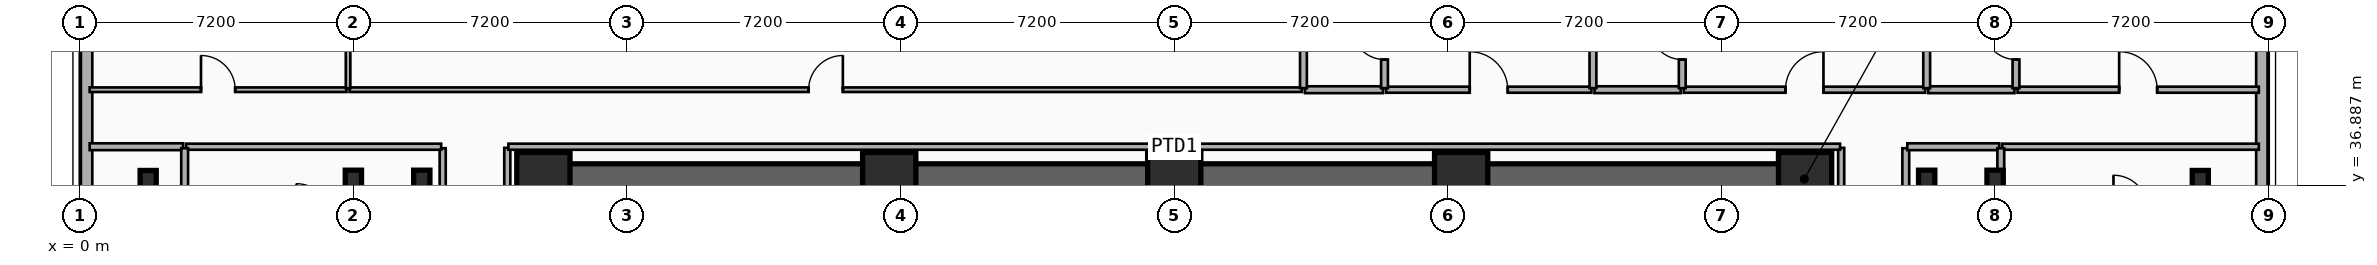
"""IFC4 building model, lengths in metres.
Left out: names, types, materials, properties, quantities, classifications, styles, units other than length and angle.
Written with IfcOpenShell. Run it as: python <this file> out.ifc"""

import sys

from ifc_helpers import new_model, si_unit, direction, frame, frame_2d, origin, origin_2d, place, context, subcontext, project, spatial, rectangle, i_section, extrude, element, fill, save


model = new_model("IFC4")
c1 = context("Model", 3, precision=1e-05, world=origin(), true_north=direction((0.0, 1.0)))
c2 = subcontext(c1, "Body", "Model", "MODEL_VIEW")
j1 = project(units=[si_unit("LENGTHUNIT", "METRE"), si_unit("PLANEANGLEUNIT", "RADIAN")], contexts=[c1])
p1 = place(None, origin())
s1 = spatial("IfcSite", under=j1, at=p1, CompositionType="ELEMENT")
p2 = place(p1, origin())
s2 = spatial("IfcBuilding", under=s1, at=p2, CompositionType="ELEMENT")
p3 = place(p2, frame((0.0, 0.0, 29.0)))
s3 = spatial("IfcBuildingStorey", under=s2, at=p3, CompositionType="ELEMENT", Elevation=29.0)
p4 = place(p3, frame((12.15, 37.05, 0.0), z_axis=(0.0, 0.0, 1.0), x_axis=(1.0, 0.0, 0.0)))
e1 = element("IfcWall", 1, at=p4, inside=s3, PredefinedType="SHEAR", context=c2, shape_type="SweptSolid", body=[
    extrude(rectangle(XDim=33.23, YDim=0.8, at=frame_2d((16.615, 0.0))), origin(), (0.0, 0.0, 1.0), 3.5),
])
for number, where, z_axis, x_axis in (
    (2, (12.2, 37.05, 0.0), (0.0, 0.0, 1.0), (1.0, 0.0, 0.0)),
    (3, (21.3, 37.05, 0.0), (0.0, 0.0, 1.0), (1.0, 0.0, 0.0)),
    (4, (28.8, 37.05, 0.0), (0.0, 0.0, 1.0), (1.0, 0.0, 0.0)),
    (5, (36.35, 37.05, 0.0), (0.0, 0.0, 1.0), (1.0, 0.0, 0.0)),
    (6, (45.4, 37.05, 0.0), (0.0, 0.0, 1.0), (1.0, 0.0, 0.0)),
):
    element("IfcColumn", number, at=place(p3, frame(where, z_axis=z_axis, x_axis=x_axis)), inside=s3, PredefinedType="COLUMN", context=c2, shape_type="SweptSolid", body=[
        extrude(rectangle(XDim=1.4, YDim=1.4, at=origin_2d()), origin(), (0.0, 0.0, 1.0), 3.5),
    ])
for number, where, z_axis, x_axis in (
    (7, (9.0, 37.05, 0.0), (0.0, 0.0, 1.0), (1.0, 0.0, 0.0)),
    (8, (48.6, 37.05, 0.0), (0.0, 0.0, 1.0), (1.0, 0.0, 0.0)),
):
    element("IfcColumn", number, at=place(p3, frame(where, z_axis=z_axis, x_axis=x_axis)), inside=s3, PredefinedType="COLUMN", context=c2, shape_type="SweptSolid", body=[
        extrude(i_section(OverallWidth=0.428, OverallDepth=0.465, WebThickness=0.045, FlangeThickness=0.073, FilletRadius=0.015, at=origin_2d()), origin(), (0.0, 0.0, 1.0), 3.5),
    ])
p5 = place(p3, frame((1.8, 37.05, 0.0), z_axis=(0.0, 0.0, 1.0), x_axis=(1.0, 0.0, 0.0)))
e9 = element("IfcColumn", 9, at=p5, inside=s3, PredefinedType="COLUMN", context=c2, shape_type="SweptSolid", body=[
    extrude(i_section(OverallWidth=0.424, OverallDepth=0.45, WebThickness=0.041, FlangeThickness=0.065, FilletRadius=0.015, at=origin_2d()), origin(), (0.0, 0.0, 1.0), 3.5),
])
for number, where, z_axis, x_axis in (
    (10, (7.2, 37.05, 0.0), (0.0, 0.0, 1.0), (1.0, 0.0, 0.0)),
    (11, (50.4, 37.05, 0.0), (0.0, 0.0, 1.0), (1.0, 0.0, 0.0)),
):
    element("IfcColumn", number, at=place(p3, frame(where, z_axis=z_axis, x_axis=x_axis)), inside=s3, PredefinedType="COLUMN", context=c2, shape_type="SweptSolid", body=[
        extrude(i_section(OverallWidth=0.428, OverallDepth=0.465, WebThickness=0.045, FlangeThickness=0.073, FilletRadius=0.015, at=origin_2d()), origin(), (0.0, 0.0, 1.0), 3.5),
    ])
p6 = place(p3, frame((55.8, 37.05, 0.0), z_axis=(0.0, 0.0, 1.0), x_axis=(1.0, 0.0, 0.0)))
e12 = element("IfcColumn", 12, at=p6, inside=s3, PredefinedType="COLUMN", context=c2, shape_type="SweptSolid", body=[
    extrude(i_section(OverallWidth=0.424, OverallDepth=0.45, WebThickness=0.041, FlangeThickness=0.065, FilletRadius=0.015, at=origin_2d()), origin(), (0.0, 0.0, 1.0), 3.5),
])
p7 = place(p3, frame((57.42, 41.0, 0.0), z_axis=(0.0, 0.0, 1.0), x_axis=(0.0, -1.0, 0.0)))
e13 = element("IfcWall", 13, at=p7, inside=s3, PredefinedType="SOLIDWALL", context=c2, shape_type="SweptSolid", body=[
    extrude(rectangle(XDim=15.2, YDim=0.3, at=frame_2d((7.6, 0.0))), origin(), (0.0, 0.0, 1.0), 3.24),
])
p8 = place(p7, frame((10.882, 0.0, 0.48)))
e14 = element("IfcOpeningElement", 14, at=p8, cuts=e13, PredefinedType="OPENING", context=c2, shape_type="SweptSolid", body=[
    extrude(rectangle(XDim=1.4, YDim=1.8, at=frame_2d((0.7, 0.9))), frame((0.0, 0.16, 0.0), z_axis=(0.0, -1.0, 0.0), x_axis=(1.0, 0.0, 0.0)), (0.0, 0.0, 1.0), 0.32),
])
p9 = place(p7, frame((5.621, 0.0, 0.48)))
e15 = element("IfcOpeningElement", 15, at=p9, cuts=e13, PredefinedType="OPENING", context=c2, shape_type="SweptSolid", body=[
    extrude(rectangle(XDim=1.4, YDim=1.8, at=frame_2d((0.7, 0.9))), frame((0.0, 0.16, 0.0), z_axis=(0.0, -1.0, 0.0), x_axis=(1.0, 0.0, 0.0)), (0.0, 0.0, 1.0), 0.32),
])
p10 = place(p3, frame((0.18, 25.8, 0.0), z_axis=(0.0, 0.0, 1.0), x_axis=(0.0, 1.0, 0.0)))
e16 = element("IfcWall", 16, at=p10, inside=s3, PredefinedType="SOLIDWALL", context=c2, shape_type="SweptSolid", body=[
    extrude(rectangle(XDim=15.2, YDim=0.3, at=frame_2d((7.6, 0.0))), origin(), (0.0, 0.0, 1.0), 3.24),
])
p11 = place(p10, frame((2.67, 0.0, 0.48)))
e17 = element("IfcOpeningElement", 17, at=p11, cuts=e16, PredefinedType="OPENING", context=c2, shape_type="SweptSolid", body=[
    extrude(rectangle(XDim=1.4, YDim=1.8, at=frame_2d((0.7, 0.9))), frame((0.0, 0.16, 0.0), z_axis=(0.0, -1.0, 0.0), x_axis=(1.0, 0.0, 0.0)), (0.0, 0.0, 1.0), 0.32),
])
p12 = place(p10, frame((7.709, 0.0, 0.48)))
e18 = element("IfcOpeningElement", 18, at=p12, cuts=e16, PredefinedType="OPENING", context=c2, shape_type="SweptSolid", body=[
    extrude(rectangle(XDim=1.4, YDim=1.8, at=frame_2d((0.7, 0.9))), frame((0.0, 0.16, 0.0), z_axis=(0.0, -1.0, 0.0), x_axis=(1.0, 0.0, 0.0)), (0.0, 0.0, 1.0), 0.32),
])
p13 = place(p3, frame((9.55, 36.067, 0.0), z_axis=(0.0, 0.0, 1.0), x_axis=(0.0, 1.0, 0.0)))
e19 = element("IfcWall", 19, at=p13, inside=s3, PredefinedType="PARTITIONING", context=c2, shape_type="SweptSolid", body=[
    extrude(rectangle(XDim=1.793, YDim=0.16, at=frame_2d((0.896, 0.0))), origin(), (0.0, 0.0, 1.0), 2.72),
])
p14 = place(p3, frame((48.05, 36.29, 0.0), z_axis=(0.0, 0.0, 1.0), x_axis=(0.0, 1.0, 0.0)))
e20 = element("IfcWall", 20, at=p14, inside=s3, PredefinedType="PLUMBINGWALL", context=c2, shape_type="SweptSolid", body=[
    extrude(rectangle(XDim=1.57, YDim=0.18, at=frame_2d((0.785, 0.0))), origin(), (0.0, 0.0, 1.0), 2.72),
])
p15 = place(p3, frame((0.26, 37.9, 0.0), z_axis=(0.0, 0.0, 1.0), x_axis=(1.0, 0.0, 0.0)))
e21 = element("IfcWall", 21, at=p15, inside=s3, PredefinedType="PLUMBINGWALL", context=c2, shape_type="SweptSolid", body=[
    extrude(rectangle(XDim=2.46, YDim=0.18, at=frame_2d((1.23, 0.0))), origin(), (0.0, 0.0, 1.0), 3.24),
])
p16 = place(p3, frame((2.8, 37.9, 0.0), z_axis=(0.0, 0.0, 1.0), x_axis=(1.0, 0.0, 0.0)))
e22 = element("IfcWall", 22, at=p16, inside=s3, PredefinedType="PARTITIONING", context=c2, shape_type="SweptSolid", body=[
    extrude(rectangle(XDim=6.71, YDim=0.16, at=frame_2d((3.355, 0.0))), origin(), (0.0, 0.0, 1.0), 3.24),
])
p17 = place(p3, frame((48.09, 37.9, 0.0), z_axis=(0.0, 0.0, 1.0), x_axis=(1.0, 0.0, 0.0)))
e23 = element("IfcWall", 23, at=p17, inside=s3, PredefinedType="PLUMBINGWALL", context=c2, shape_type="SweptSolid", body=[
    extrude(rectangle(XDim=2.42, YDim=0.18, at=frame_2d((1.21, 0.0))), origin(), (0.0, 0.0, 1.0), 3.24),
])
p18 = place(p3, frame((50.59, 37.9, 0.0), z_axis=(0.0, 0.0, 1.0), x_axis=(1.0, 0.0, 0.0)))
e24 = element("IfcWall", 24, at=p18, inside=s3, PredefinedType="PARTITIONING", context=c2, shape_type="SweptSolid", body=[
    extrude(rectangle(XDim=6.75, YDim=0.16, at=frame_2d((3.375, 0.0))), origin(), (0.0, 0.0, 1.0), 3.24),
])
p19 = place(p3, frame((0.26, 39.4, 0.0), z_axis=(0.0, 0.0, 1.0), x_axis=(1.0, 0.0, 0.0)))
e25 = element("IfcWall", 25, at=p19, inside=s3, PredefinedType="PARTITIONING", context=c2, shape_type="SweptSolid", body=[
    extrude(rectangle(XDim=6.76, YDim=0.12, at=frame_2d((3.38, 0.0))), origin(), (0.0, 0.0, 1.0), 3.24),
])
p20 = place(p19, frame((2.93, 0.0, 0.0)))
e26 = element("IfcOpeningElement", 26, at=p20, cuts=e25, PredefinedType="OPENING", context=c2, shape_type="SweptSolid", body=[
    extrude(rectangle(XDim=0.9, YDim=2.1, at=frame_2d((0.45, 1.05))), frame((0.0, 0.07, 0.0), z_axis=(0.0, -1.0, 0.0), x_axis=(1.0, 0.0, 0.0)), (0.0, 0.0, 1.0), 0.14),
])
p21 = place(p3, frame((7.1, 39.4, 0.0), z_axis=(0.0, 0.0, 1.0), x_axis=(1.0, 0.0, 0.0)))
e27 = element("IfcWall", 27, at=p21, inside=s3, PredefinedType="PARTITIONING", context=c2, shape_type="SweptSolid", body=[
    extrude(rectangle(XDim=25.06, YDim=0.12, at=frame_2d((12.53, 0.0))), origin(), (0.0, 0.0, 1.0), 3.24),
])
p22 = place(p21, frame((12.08, 0.0, 0.0)))
e28 = element("IfcOpeningElement", 28, at=p22, cuts=e27, PredefinedType="OPENING", context=c2, shape_type="SweptSolid", body=[
    extrude(rectangle(XDim=0.9, YDim=2.1, at=frame_2d((0.45, 1.05))), frame((0.0, 0.07, 0.0), z_axis=(0.0, -1.0, 0.0), x_axis=(1.0, 0.0, 0.0)), (0.0, 0.0, 1.0), 0.14),
])
p23 = place(p3, frame((34.373, 39.4, 0.0), z_axis=(0.0, 0.0, 1.0), x_axis=(1.0, 0.0, 0.0)))
e29 = element("IfcWall", 29, at=p23, inside=s3, PredefinedType="PARTITIONING", context=c2, shape_type="SweptSolid", body=[
    extrude(rectangle(XDim=5.405, YDim=0.16, at=frame_2d((2.703, 0.0))), origin(), (0.0, 0.0, 1.0), 3.24),
])
p24 = place(p23, frame((2.202, 0.0, 0.0)))
e30 = element("IfcOpeningElement", 30, at=p24, cuts=e29, PredefinedType="OPENING", context=c2, shape_type="SweptSolid", body=[
    extrude(rectangle(XDim=1.0, YDim=2.15, at=frame_2d((0.5, 1.075))), frame((0.0, 0.09, 0.0), z_axis=(0.0, -1.0, 0.0), x_axis=(1.0, 0.0, 0.0)), (0.0, 0.0, 1.0), 0.18),
])
p25 = place(p3, frame((32.24, 39.4, 0.0), z_axis=(0.0, 0.0, 1.0), x_axis=(1.0, 0.0, 0.0)))
e31 = element("IfcWall", 31, at=p25, inside=s3, PredefinedType="PLUMBINGWALL", context=c2, shape_type="SweptSolid", body=[
    extrude(rectangle(XDim=2.053, YDim=0.18, at=frame_2d((1.026, 0.0))), origin(), (0.0, 0.0, 1.0), 3.24),
])
p26 = place(p3, frame((42.208, 39.4, 0.0), z_axis=(0.0, 0.0, 1.0), x_axis=(1.0, 0.0, 0.0)))
e32 = element("IfcWall", 32, at=p26, inside=s3, PredefinedType="PARTITIONING", context=c2, shape_type="SweptSolid", body=[
    extrude(rectangle(XDim=6.352, YDim=0.16, at=frame_2d((3.176, 0.0))), origin(), (0.0, 0.0, 1.0), 3.24),
])
p27 = place(p26, frame((2.676, 0.0, 0.0)))
e33 = element("IfcOpeningElement", 33, at=p27, cuts=e32, PredefinedType="OPENING", context=c2, shape_type="SweptSolid", body=[
    extrude(rectangle(XDim=1.0, YDim=2.15, at=frame_2d((0.5, 1.075))), frame((0.0, 0.09, 0.0), z_axis=(0.0, -1.0, 0.0), x_axis=(1.0, 0.0, 0.0)), (0.0, 0.0, 1.0), 0.18),
])
p28 = place(p3, frame((39.858, 39.4, 0.0), z_axis=(0.0, 0.0, 1.0), x_axis=(1.0, 0.0, 0.0)))
e34 = element("IfcWall", 34, at=p28, inside=s3, PredefinedType="PLUMBINGWALL", context=c2, shape_type="SweptSolid", body=[
    extrude(rectangle(XDim=2.27, YDim=0.18, at=frame_2d((1.135, 0.0))), origin(), (0.0, 0.0, 1.0), 3.24),
])
p29 = place(p3, frame((50.99, 39.4, 0.0), z_axis=(0.0, 0.0, 1.0), x_axis=(1.0, 0.0, 0.0)))
e35 = element("IfcWall", 35, at=p29, inside=s3, PredefinedType="PARTITIONING", context=c2, shape_type="SweptSolid", body=[
    extrude(rectangle(XDim=6.35, YDim=0.16, at=frame_2d((3.175, 0.0))), origin(), (0.0, 0.0, 1.0), 3.24),
])
p30 = place(p29, frame((2.675, 0.0, 0.0)))
e36 = element("IfcOpeningElement", 36, at=p30, cuts=e35, PredefinedType="OPENING", context=c2, shape_type="SweptSolid", body=[
    extrude(rectangle(XDim=1.0, YDim=2.15, at=frame_2d((0.5, 1.075))), frame((0.0, 0.09, 0.0), z_axis=(0.0, -1.0, 0.0), x_axis=(1.0, 0.0, 0.0)), (0.0, 0.0, 1.0), 0.18),
])
p31 = place(p3, frame((48.64, 39.4, 0.0), z_axis=(0.0, 0.0, 1.0), x_axis=(1.0, 0.0, 0.0)))
e37 = element("IfcWall", 37, at=p31, inside=s3, PredefinedType="PLUMBINGWALL", context=c2, shape_type="SweptSolid", body=[
    extrude(rectangle(XDim=2.27, YDim=0.18, at=frame_2d((1.135, 0.0))), origin(), (0.0, 0.0, 1.0), 3.24),
])
p32 = place(p3, frame((2.76, 36.067, 0.0), z_axis=(0.0, 0.0, 1.0), x_axis=(0.0, 1.0, 0.0)))
e38 = element("IfcWall", 38, at=p32, inside=s3, PredefinedType="PLUMBINGWALL", context=c2, shape_type="SweptSolid", body=[
    extrude(rectangle(XDim=1.793, YDim=0.18, at=frame_2d((0.896, 0.0))), origin(), (0.0, 0.0, 1.0), 2.72),
])
p33 = place(p3, frame((50.55, 36.29, 0.0), z_axis=(0.0, 0.0, 1.0), x_axis=(0.0, 1.0, 0.0)))
e39 = element("IfcWall", 39, at=p33, inside=s3, PredefinedType="PLUMBINGWALL", context=c2, shape_type="SweptSolid", body=[
    extrude(rectangle(XDim=1.57, YDim=0.18, at=frame_2d((0.785, 0.0))), origin(), (0.0, 0.0, 1.0), 2.57),
])
p34 = place(p3, frame((7.06, 39.44, 0.0), z_axis=(0.0, 0.0, 1.0), x_axis=(0.0, 1.0, 0.0)))
e40 = element("IfcWall", 40, at=p34, inside=s3, PredefinedType="PARTITIONING", context=c2, shape_type="SweptSolid", body=[
    extrude(rectangle(XDim=5.5, YDim=0.12, at=frame_2d((2.75, 0.0))), origin(), (0.0, 0.0, 1.0), 3.24),
])
p35 = place(p3, frame((32.2, 39.44, 0.0), z_axis=(0.0, 0.0, 1.0), x_axis=(0.0, 1.0, 0.0)))
e41 = element("IfcWall", 41, at=p35, inside=s3, PredefinedType="PLUMBINGWALL", context=c2, shape_type="SweptSolid", body=[
    extrude(rectangle(XDim=2.358, YDim=0.18, at=frame_2d((1.179, 0.0))), origin(), (0.0, 0.0, 1.0), 3.24),
])
p36 = place(p3, frame((34.333, 39.44, 0.0), z_axis=(0.0, 0.0, 1.0), x_axis=(0.0, 1.0, 0.0)))
e42 = element("IfcWall", 42, at=p36, inside=s3, PredefinedType="PLUMBINGWALL", context=c2, shape_type="SweptSolid", body=[
    extrude(rectangle(XDim=2.358, YDim=0.18, at=frame_2d((1.179, 0.0))), origin(), (0.0, 0.0, 1.0), 3.24),
])
p37 = place(p36, frame((0.754, 0.0, 0.0)))
e43 = element("IfcOpeningElement", 43, at=p37, cuts=e42, PredefinedType="OPENING", context=c2, shape_type="SweptSolid", body=[
    extrude(rectangle(XDim=0.85, YDim=2.1, at=frame_2d((0.425, 1.05))), frame((0.0, 0.1, 0.0), z_axis=(0.0, -1.0, 0.0), x_axis=(1.0, 0.0, 0.0)), (0.0, 0.0, 1.0), 0.2),
])
p38 = place(p3, frame((39.818, 39.44, 0.0), z_axis=(0.0, 0.0, 1.0), x_axis=(0.0, 1.0, 0.0)))
e44 = element("IfcWall", 44, at=p38, inside=s3, PredefinedType="PLUMBINGWALL", context=c2, shape_type="SweptSolid", body=[
    extrude(rectangle(XDim=2.358, YDim=0.18, at=frame_2d((1.179, 0.0))), origin(), (0.0, 0.0, 1.0), 3.24),
])
p39 = place(p3, frame((42.168, 39.44, 0.0), z_axis=(0.0, 0.0, 1.0), x_axis=(0.0, 1.0, 0.0)))
e45 = element("IfcWall", 45, at=p39, inside=s3, PredefinedType="PLUMBINGWALL", context=c2, shape_type="SweptSolid", body=[
    extrude(rectangle(XDim=2.358, YDim=0.18, at=frame_2d((1.179, 0.0))), origin(), (0.0, 0.0, 1.0), 3.24),
])
p40 = place(p39, frame((0.754, 0.0, 0.0)))
e46 = element("IfcOpeningElement", 46, at=p40, cuts=e45, PredefinedType="OPENING", context=c2, shape_type="SweptSolid", body=[
    extrude(rectangle(XDim=0.85, YDim=2.1, at=frame_2d((0.425, 1.05))), frame((0.0, 0.1, 0.0), z_axis=(0.0, -1.0, 0.0), x_axis=(1.0, 0.0, 0.0)), (0.0, 0.0, 1.0), 0.2),
])
p41 = place(p3, frame((48.6, 39.44, 0.0), z_axis=(0.0, 0.0, 1.0), x_axis=(0.0, 1.0, 0.0)))
e47 = element("IfcWall", 47, at=p41, inside=s3, PredefinedType="PLUMBINGWALL", context=c2, shape_type="SweptSolid", body=[
    extrude(rectangle(XDim=2.358, YDim=0.18, at=frame_2d((1.179, 0.0))), origin(), (0.0, 0.0, 1.0), 3.24),
])
p42 = place(p3, frame((50.95, 39.44, 0.0), z_axis=(0.0, 0.0, 1.0), x_axis=(0.0, 1.0, 0.0)))
e48 = element("IfcWall", 48, at=p42, inside=s3, PredefinedType="PLUMBINGWALL", context=c2, shape_type="SweptSolid", body=[
    extrude(rectangle(XDim=2.358, YDim=0.18, at=frame_2d((1.179, 0.0))), origin(), (0.0, 0.0, 1.0), 3.24),
])
p43 = place(p42, frame((0.754, 0.0, 0.0)))
e49 = element("IfcOpeningElement", 49, at=p43, cuts=e48, PredefinedType="OPENING", context=c2, shape_type="SweptSolid", body=[
    extrude(rectangle(XDim=0.85, YDim=2.1, at=frame_2d((0.425, 1.05))), frame((0.0, 0.1, 0.0), z_axis=(0.0, -1.0, 0.0), x_axis=(1.0, 0.0, 0.0)), (0.0, 0.0, 1.0), 0.2),
])
for number, where, z_axis, x_axis in (
    (50, (11.25, 27.63, 0.0), (0.0, 0.0, 1.0), (0.0, 1.0, 0.0)),
    (51, (46.35, 27.63, 0.0), (0.0, 0.0, 1.0), (0.0, 1.0, 0.0)),
):
    element("IfcWall", number, at=place(p3, frame(where, z_axis=z_axis, x_axis=x_axis)), inside=s3, PredefinedType="PARTITIONING", context=c2, shape_type="SweptSolid", body=[
        extrude(rectangle(XDim=10.24, YDim=0.16, at=frame_2d((5.12, 0.0))), origin(), (0.0, 0.0, 1.0), 2.72),
    ])
p44 = place(p3, frame((11.28, 37.9, 0.0), z_axis=(0.0, 0.0, 1.0), x_axis=(1.0, 0.0, 0.0)))
e52 = element("IfcWall", 52, at=p44, inside=s3, PredefinedType="PARTITIONING", context=c2, shape_type="SweptSolid", body=[
    extrude(rectangle(XDim=35.04, YDim=0.16, at=frame_2d((17.52, 0.0))), origin(), (0.0, 0.0, 1.0), 3.24),
])
p45 = place(p20, origin())
e53 = element("IfcDoor", 53, at=p45, inside=s3, OperationType="SINGLE_SWING_LEFT", PredefinedType="DOOR", context=c2, shape_type="SweptSolid", body=[
    extrude(rectangle(XDim=0.9, YDim=2.1, at=frame_2d((0.45, 1.05))), frame((0.0, 0.025, 0.0), z_axis=(0.0, -1.0, 0.0), x_axis=(1.0, 0.0, 0.0)), (0.0, 0.0, 1.0), 0.05),
])
fill(e26, e53)
p46 = place(p22, origin())
e54 = element("IfcDoor", 54, at=p46, inside=s3, OperationType="SINGLE_SWING_RIGHT", PredefinedType="DOOR", context=c2, shape_type="SweptSolid", body=[
    extrude(rectangle(XDim=0.9, YDim=2.1, at=frame_2d((0.45, 1.05))), frame((0.0, 0.025, 0.0), z_axis=(0.0, -1.0, 0.0), x_axis=(1.0, 0.0, 0.0)), (0.0, 0.0, 1.0), 0.05),
])
fill(e28, e54)
p47 = place(p24, origin())
e55 = element("IfcDoor", 55, at=p47, inside=s3, OperationType="SINGLE_SWING_LEFT", PredefinedType="DOOR", context=c2, shape_type="SweptSolid", body=[
    extrude(rectangle(XDim=1.0, YDim=2.15, at=frame_2d((0.5, 1.075))), frame((0.0, 0.025, 0.0), z_axis=(0.0, -1.0, 0.0), x_axis=(1.0, 0.0, 0.0)), (0.0, 0.0, 1.0), 0.05),
])
fill(e30, e55)
p48 = place(p27, origin())
e56 = element("IfcDoor", 56, at=p48, inside=s3, OperationType="SINGLE_SWING_RIGHT", PredefinedType="DOOR", context=c2, shape_type="SweptSolid", body=[
    extrude(rectangle(XDim=1.0, YDim=2.15, at=frame_2d((0.5, 1.075))), frame((0.0, 0.025, 0.0), z_axis=(0.0, -1.0, 0.0), x_axis=(1.0, 0.0, 0.0)), (0.0, 0.0, 1.0), 0.05),
])
fill(e33, e56)
p49 = place(p30, origin())
e57 = element("IfcDoor", 57, at=p49, inside=s3, OperationType="SINGLE_SWING_LEFT", PredefinedType="DOOR", context=c2, shape_type="SweptSolid", body=[
    extrude(rectangle(XDim=1.0, YDim=2.15, at=frame_2d((0.5, 1.075))), frame((0.0, 0.025, 0.0), z_axis=(0.0, -1.0, 0.0), x_axis=(1.0, 0.0, 0.0)), (0.0, 0.0, 1.0), 0.05),
])
fill(e36, e57)
p50 = place(p37, origin())
e58 = element("IfcDoor", 58, at=p50, inside=s3, OperationType="SINGLE_SWING_RIGHT", PredefinedType="DOOR", context=c2, shape_type="SweptSolid", body=[
    extrude(rectangle(XDim=0.85, YDim=2.1, at=frame_2d((0.425, 1.05))), frame((0.0, 0.025, 0.0), z_axis=(0.0, -1.0, 0.0), x_axis=(1.0, 0.0, 0.0)), (0.0, 0.0, 1.0), 0.05),
])
fill(e43, e58)
p51 = place(p40, origin())
e59 = element("IfcDoor", 59, at=p51, inside=s3, OperationType="SINGLE_SWING_RIGHT", PredefinedType="DOOR", context=c2, shape_type="SweptSolid", body=[
    extrude(rectangle(XDim=0.85, YDim=2.1, at=frame_2d((0.425, 1.05))), frame((0.0, 0.025, 0.0), z_axis=(0.0, -1.0, 0.0), x_axis=(1.0, 0.0, 0.0)), (0.0, 0.0, 1.0), 0.05),
])
fill(e46, e59)
p52 = place(p43, origin())
e60 = element("IfcDoor", 60, at=p52, inside=s3, OperationType="SINGLE_SWING_RIGHT", PredefinedType="DOOR", context=c2, shape_type="SweptSolid", body=[
    extrude(rectangle(XDim=0.85, YDim=2.1, at=frame_2d((0.425, 1.05))), frame((0.0, 0.025, 0.0), z_axis=(0.0, -1.0, 0.0), x_axis=(1.0, 0.0, 0.0)), (0.0, 0.0, 1.0), 0.05),
])
fill(e49, e60)
save(model, sys.argv[1])
